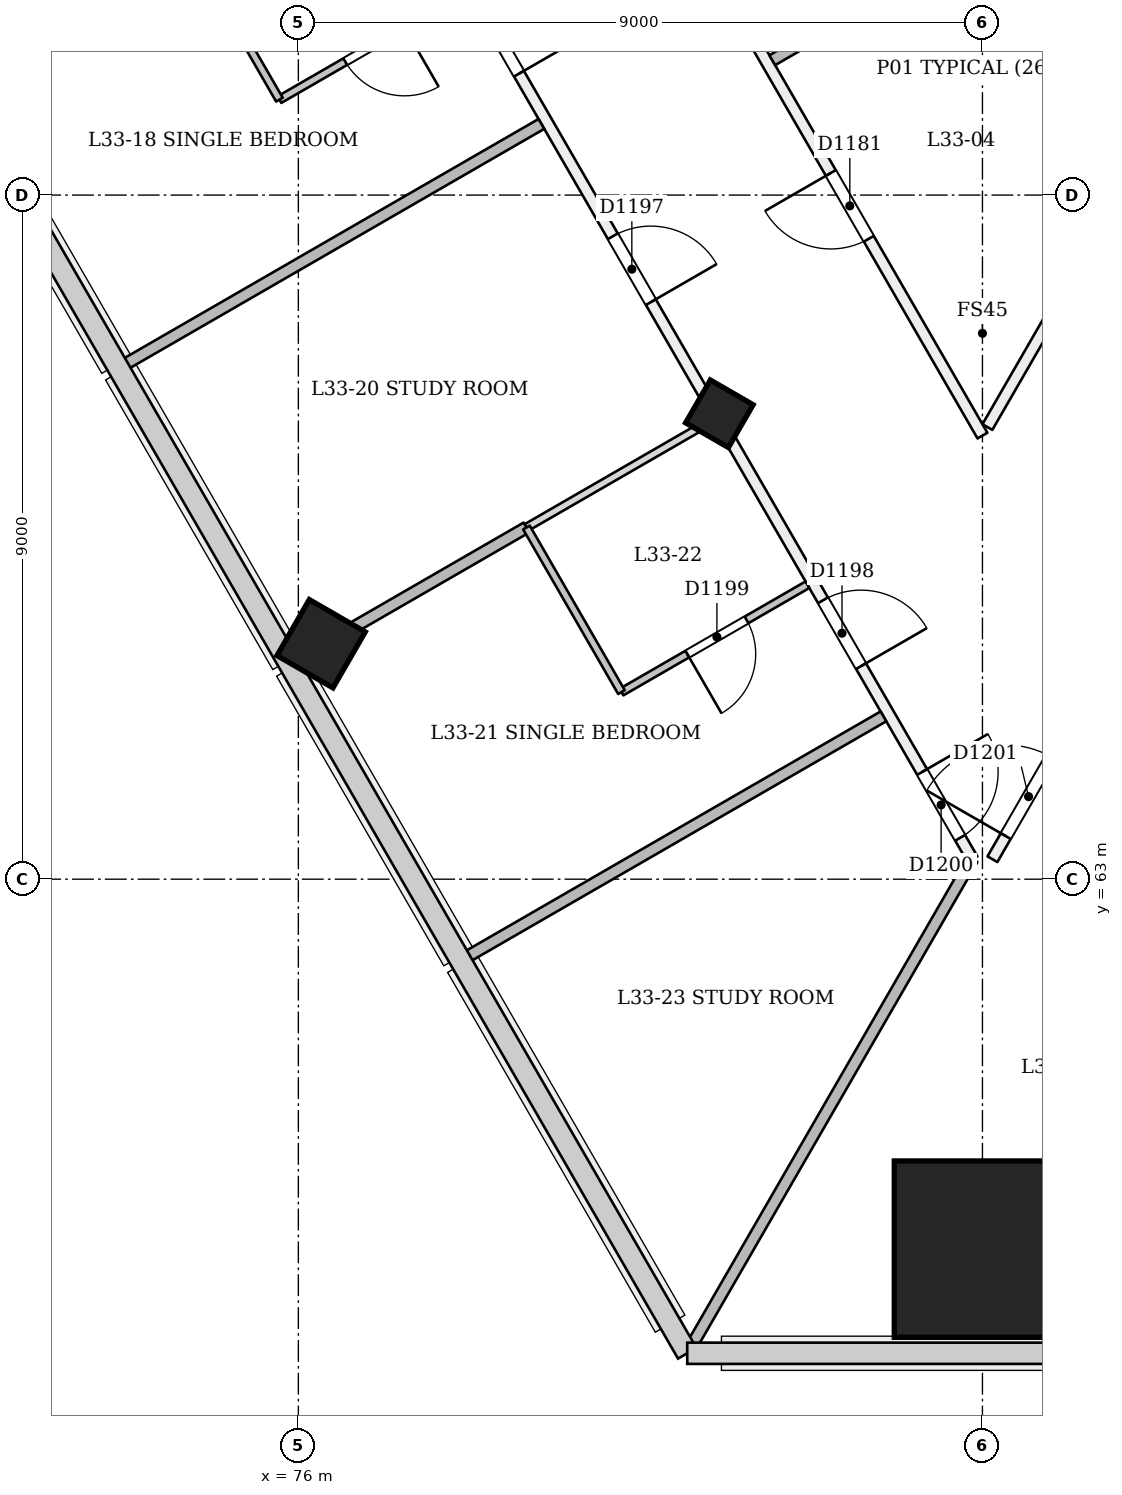
"""IFC4 building model, lengths in metres.
Left out: names, types, materials, properties, quantities, classifications, styles, units other than length and angle.
Written with IfcOpenShell. Run it as: python <this file> out.ifc"""

import sys

from ifc_helpers import new_model, si_unit, direction, frame, frame_2d, origin, origin_2d, place, context, subcontext, project, spatial, rectangle, extrude, element, fill, save


model = new_model("IFC4")
c1 = context("Model", 3, precision=1e-05, world=origin(), true_north=direction((0.0, 1.0)))
c2 = subcontext(c1, "Body", "Model", "MODEL_VIEW")
j1 = project(units=[si_unit("LENGTHUNIT", "METRE"), si_unit("PLANEANGLEUNIT", "RADIAN")], contexts=[c1])
p1 = place(None, origin())
s1 = spatial("IfcSite", under=j1, at=p1, CompositionType="ELEMENT")
p2 = place(p1, origin())
s2 = spatial("IfcBuilding", under=s1, at=p2, CompositionType="ELEMENT")
p3 = place(p2, frame((0.0, 0.0, 131.4)))
s3 = spatial("IfcBuildingStorey", under=s2, at=p3, CompositionType="ELEMENT", Elevation=131.4)
p4 = place(p3, frame((81.512, 69.076, -0.02), z_axis=(0.022155133694, 0.038483534979, 0.999013597298), x_axis=(-0.864982357223, -0.500326545966, 0.038456067068)))
e1 = element("IfcColumn", 1, at=p4, inside=s3, PredefinedType="COLUMN", context=c2, shape_type="SweptSolid", body=[
    extrude(rectangle(XDim=0.65, YDim=0.65, at=origin_2d()), origin(), (0.0, 0.0, 1.0), 3.604),
])
p5 = place(p3, frame((85.0, 58.063, 0.0), z_axis=(0.0, 0.058356907999, 0.998295783467), x_axis=(-1.0, 0.0, 0.0)))
e2 = element("IfcColumn", 2, at=p5, inside=s3, PredefinedType="COLUMN", context=c2, shape_type="SweptSolid", body=[
    extrude(rectangle(XDim=2.32, YDim=2.32, at=origin_2d()), origin(), (0.0, 0.0, 1.0), 3.606),
])
p6 = place(p3, frame((76.272, 66.051, -0.026), z_axis=(0.022222910879, 0.038415824599, 0.999014697916), x_axis=(-0.866023998813, -0.498523032246, 0.038434617219)))
e3 = element("IfcColumn", 3, at=p6, inside=s3, PredefinedType="COLUMN", context=c2, shape_type="SweptSolid", body=[
    extrude(rectangle(XDim=0.85, YDim=0.85, at=origin_2d()), origin(), (0.0, 0.0, 1.0), 3.604),
])
p7 = place(p3, frame((85.0, 68.836, 0.0), z_axis=(0.0, 0.0, 1.0), x_axis=(-0.500001726771, 0.86602440683, 0.0)))
e4 = element("IfcWall", 4, at=p7, inside=s3, PredefinedType="PARTITIONING", context=c2, shape_type="SweptSolid", body=[
    extrude(rectangle(XDim=24.669, YDim=0.15, at=frame_2d((12.335, 0.0))), origin(), (0.0, 0.0, 1.0), 3.15),
])
p8 = place(p7, frame((2.99, 0.0, 0.0)))
e5 = element("IfcOpeningElement", 5, at=p8, cuts=e4, PredefinedType="OPENING", context=c2, shape_type="SweptSolid", body=[
    extrude(rectangle(XDim=1.0, YDim=2.1, at=frame_2d((0.5, 1.05))), frame((0.0, 0.085, 0.0), z_axis=(0.0, -1.0, 0.0), x_axis=(1.0, 0.0, 0.0)), (0.0, 0.0, 1.0), 0.171),
])
p9 = place(p7, frame((15.596, 0.0, 0.0)))
e6 = element("IfcOpeningElement", 6, at=p9, cuts=e4, PredefinedType="OPENING", context=c2, shape_type="SweptSolid", body=[
    extrude(rectangle(XDim=1.0, YDim=2.1, at=frame_2d((0.5, 1.05))), frame((0.0, 0.085, 0.0), z_axis=(0.0, -1.0, 0.0), x_axis=(1.0, 0.0, 0.0)), (0.0, 0.0, 1.0), 0.171),
])
p10 = place(p7, frame((20.822, 0.0, 0.0)))
e7 = element("IfcOpeningElement", 7, at=p10, cuts=e4, PredefinedType="OPENING", context=c2, shape_type="SweptSolid", body=[
    extrude(rectangle(XDim=1.0, YDim=2.1, at=frame_2d((0.5, 1.05))), frame((0.0, 0.085, 0.0), z_axis=(0.0, -1.0, 0.0), x_axis=(1.0, 0.0, 0.0)), (0.0, 0.0, 1.0), 0.171),
])
p11 = place(p7, frame((11.43, 0.0, 0.0)))
e8 = element("IfcOpeningElement", 8, at=p11, cuts=e4, PredefinedType="OPENING", context=c2, shape_type="SweptSolid", body=[
    extrude(rectangle(XDim=1.0, YDim=2.1, at=frame_2d((0.5, 1.05))), frame((0.0, 0.085, 0.0), z_axis=(0.0, -1.0, 0.0), x_axis=(1.0, 0.0, 0.0)), (0.0, 0.0, 1.0), 0.171),
])
p12 = place(p7, frame((7.41, 0.0, 0.0)))
e9 = element("IfcOpeningElement", 9, at=p12, cuts=e4, PredefinedType="OPENING", context=c2, shape_type="SweptSolid", body=[
    extrude(rectangle(XDim=1.0, YDim=2.1, at=frame_2d((0.5, 1.05))), frame((0.0, 0.085, 0.0), z_axis=(0.0, -1.0, 0.0), x_axis=(1.0, 0.0, 0.0)), (0.0, 0.0, 1.0), 0.171),
])
p13 = place(p3, frame((64.656, 98.273, 0.0), z_axis=(0.0, 0.0, 1.0), x_axis=(0.500001784794, -0.866024373331, 0.0)))
e10 = element("IfcWall", 10, at=p13, inside=s3, PredefinedType="PARTITIONING", context=c2, shape_type="SweptSolid", body=[
    extrude(rectangle(XDim=40.426, YDim=0.15, at=frame_2d((20.213, 0.0))), origin(), (0.0, 0.0, 1.0), 2.75),
])
p14 = place(p13, frame((0.2, 0.0, 0.0)))
e11 = element("IfcOpeningElement", 11, at=p14, cuts=e10, PredefinedType="OPENING", context=c2, shape_type="SweptSolid", body=[
    extrude(rectangle(XDim=1.2, YDim=2.1, at=frame_2d((0.6, 1.05))), frame((0.0, 0.085, 0.0), z_axis=(0.0, -1.0, 0.0), x_axis=(1.0, 0.0, 0.0)), (0.0, 0.0, 1.0), 0.171),
])
p15 = place(p13, frame((2.933, 0.0, 0.0)))
e12 = element("IfcOpeningElement", 12, at=p15, cuts=e10, PredefinedType="OPENING", context=c2, shape_type="SweptSolid", body=[
    extrude(rectangle(XDim=1.0, YDim=2.1, at=frame_2d((0.5, 1.05))), frame((0.0, 0.085, 0.0), z_axis=(0.0, -1.0, 0.0), x_axis=(1.0, 0.0, 0.0)), (0.0, 0.0, 1.0), 0.171),
])
p16 = place(p13, frame((9.608, 0.0, 0.0)))
e13 = element("IfcOpeningElement", 13, at=p16, cuts=e10, PredefinedType="OPENING", context=c2, shape_type="SweptSolid", body=[
    extrude(rectangle(XDim=1.0, YDim=2.1, at=frame_2d((0.5, 1.05))), frame((0.0, 0.085, 0.0), z_axis=(0.0, -1.0, 0.0), x_axis=(1.0, 0.0, 0.0)), (0.0, 0.0, 1.0), 0.171),
])
p17 = place(p13, frame((11.818, 0.0, 0.0)))
e14 = element("IfcOpeningElement", 14, at=p17, cuts=e10, PredefinedType="OPENING", context=c2, shape_type="SweptSolid", body=[
    extrude(rectangle(XDim=1.0, YDim=2.1, at=frame_2d((0.5, 1.05))), frame((0.0, 0.085, 0.0), z_axis=(0.0, -1.0, 0.0), x_axis=(1.0, 0.0, 0.0)), (0.0, 0.0, 1.0), 0.171),
])
p18 = place(p13, frame((18.493, 0.0, 0.0)))
e15 = element("IfcOpeningElement", 15, at=p18, cuts=e10, PredefinedType="OPENING", context=c2, shape_type="SweptSolid", body=[
    extrude(rectangle(XDim=1.0, YDim=2.1, at=frame_2d((0.5, 1.05))), frame((0.0, 0.085, 0.0), z_axis=(0.0, -1.0, 0.0), x_axis=(1.0, 0.0, 0.0)), (0.0, 0.0, 1.0), 0.171),
])
p19 = place(p13, frame((21.963, 0.0, 0.0)))
e16 = element("IfcOpeningElement", 16, at=p19, cuts=e10, PredefinedType="OPENING", context=c2, shape_type="SweptSolid", body=[
    extrude(rectangle(XDim=1.0, YDim=2.1, at=frame_2d((0.5, 1.05))), frame((0.0, 0.085, 0.0), z_axis=(0.0, -1.0, 0.0), x_axis=(1.0, 0.0, 0.0)), (0.0, 0.0, 1.0), 0.171),
])
p20 = place(p13, frame((27.493, 0.0, 0.0)))
e17 = element("IfcOpeningElement", 17, at=p20, cuts=e10, PredefinedType="OPENING", context=c2, shape_type="SweptSolid", body=[
    extrude(rectangle(XDim=1.0, YDim=2.1, at=frame_2d((0.5, 1.05))), frame((0.0, 0.085, 0.0), z_axis=(0.0, -1.0, 0.0), x_axis=(1.0, 0.0, 0.0)), (0.0, 0.0, 1.0), 0.171),
])
p21 = place(p13, frame((30.963, 0.0, 0.0)))
e18 = element("IfcOpeningElement", 18, at=p21, cuts=e10, PredefinedType="OPENING", context=c2, shape_type="SweptSolid", body=[
    extrude(rectangle(XDim=1.0, YDim=2.1, at=frame_2d((0.5, 1.05))), frame((0.0, 0.085, 0.0), z_axis=(0.0, -1.0, 0.0), x_axis=(1.0, 0.0, 0.0)), (0.0, 0.0, 1.0), 0.171),
])
p22 = place(p13, frame((36.493, 0.0, 0.0)))
e19 = element("IfcOpeningElement", 19, at=p22, cuts=e10, PredefinedType="OPENING", context=c2, shape_type="SweptSolid", body=[
    extrude(rectangle(XDim=1.0, YDim=2.1, at=frame_2d((0.5, 1.05))), frame((0.0, 0.085, 0.0), z_axis=(0.0, -1.0, 0.0), x_axis=(1.0, 0.0, 0.0)), (0.0, 0.0, 1.0), 0.171),
])
p23 = place(p13, frame((39.101, 0.0, 0.0)))
e20 = element("IfcOpeningElement", 20, at=p23, cuts=e10, PredefinedType="OPENING", context=c2, shape_type="SweptSolid", body=[
    extrude(rectangle(XDim=1.0, YDim=2.1, at=frame_2d((0.5, 1.05))), frame((0.0, 0.085, 0.0), z_axis=(0.0, -1.0, 0.0), x_axis=(1.0, 0.0, 0.0)), (0.0, 0.0, 1.0), 0.171),
])
p24 = place(p3, frame((85.131, 63.263, 0.0), z_axis=(0.0, 0.0, 1.0), x_axis=(0.500002881847, 0.866023739943, 0.0)))
e21 = element("IfcWall", 21, at=p24, inside=s3, PredefinedType="PARTITIONING", context=c2, shape_type="SweptSolid", body=[
    extrude(rectangle(XDim=34.013, YDim=0.15, at=frame_2d((17.006, 0.0))), origin(), (0.0, 0.0, 1.0), 2.75),
])
p25 = place(p24, frame((0.351, 0.0, 0.0)))
e22 = element("IfcOpeningElement", 22, at=p25, cuts=e21, PredefinedType="OPENING", context=c2, shape_type="SweptSolid", body=[
    extrude(rectangle(XDim=1.2, YDim=2.1, at=frame_2d((0.6, 1.05))), frame((0.0, 0.085, 0.0), z_axis=(0.0, -1.0, 0.0), x_axis=(1.0, 0.0, 0.0)), (0.0, 0.0, 1.0), 0.171),
])
p26 = place(p24, frame((3.963, 0.0, 0.0)))
e23 = element("IfcOpeningElement", 23, at=p26, cuts=e21, PredefinedType="OPENING", context=c2, shape_type="SweptSolid", body=[
    extrude(rectangle(XDim=1.0, YDim=2.1, at=frame_2d((0.5, 1.05))), frame((0.0, 0.085, 0.0), z_axis=(0.0, -1.0, 0.0), x_axis=(1.0, 0.0, 0.0)), (0.0, 0.0, 1.0), 0.171),
])
p27 = place(p24, frame((9.493, 0.0, 0.0)))
e24 = element("IfcOpeningElement", 24, at=p27, cuts=e21, PredefinedType="OPENING", context=c2, shape_type="SweptSolid", body=[
    extrude(rectangle(XDim=1.0, YDim=2.1, at=frame_2d((0.5, 1.05))), frame((0.0, 0.085, 0.0), z_axis=(0.0, -1.0, 0.0), x_axis=(1.0, 0.0, 0.0)), (0.0, 0.0, 1.0), 0.171),
])
p28 = place(p24, frame((11.818, 0.0, 0.0)))
e25 = element("IfcOpeningElement", 25, at=p28, cuts=e21, PredefinedType="OPENING", context=c2, shape_type="SweptSolid", body=[
    extrude(rectangle(XDim=1.0, YDim=2.1, at=frame_2d((0.5, 1.05))), frame((0.0, 0.085, 0.0), z_axis=(0.0, -1.0, 0.0), x_axis=(1.0, 0.0, 0.0)), (0.0, 0.0, 1.0), 0.171),
])
p29 = place(p24, frame((18.608, 0.0, 0.0)))
e26 = element("IfcOpeningElement", 26, at=p29, cuts=e21, PredefinedType="OPENING", context=c2, shape_type="SweptSolid", body=[
    extrude(rectangle(XDim=1.0, YDim=2.1, at=frame_2d((0.5, 1.05))), frame((0.0, 0.085, 0.0), z_axis=(0.0, -1.0, 0.0), x_axis=(1.0, 0.0, 0.0)), (0.0, 0.0, 1.0), 0.171),
])
p30 = place(p24, frame((20.933, 0.0, 0.0)))
e27 = element("IfcOpeningElement", 27, at=p30, cuts=e21, PredefinedType="OPENING", context=c2, shape_type="SweptSolid", body=[
    extrude(rectangle(XDim=1.0, YDim=2.1, at=frame_2d((0.5, 1.05))), frame((0.0, 0.085, 0.0), z_axis=(0.0, -1.0, 0.0), x_axis=(1.0, 0.0, 0.0)), (0.0, 0.0, 1.0), 0.171),
])
p31 = place(p24, frame((27.493, 0.0, 0.0)))
e28 = element("IfcOpeningElement", 28, at=p31, cuts=e21, PredefinedType="OPENING", context=c2, shape_type="SweptSolid", body=[
    extrude(rectangle(XDim=1.0, YDim=2.1, at=frame_2d((0.5, 1.05))), frame((0.0, 0.085, 0.0), z_axis=(0.0, -1.0, 0.0), x_axis=(1.0, 0.0, 0.0)), (0.0, 0.0, 1.0), 0.171),
])
p32 = place(p24, frame((29.933, 0.0, 0.0)))
e29 = element("IfcOpeningElement", 29, at=p32, cuts=e21, PredefinedType="OPENING", context=c2, shape_type="SweptSolid", body=[
    extrude(rectangle(XDim=1.0, YDim=2.1, at=frame_2d((0.5, 1.05))), frame((0.0, 0.085, 0.0), z_axis=(0.0, -1.0, 0.0), x_axis=(1.0, 0.0, 0.0)), (0.0, 0.0, 1.0), 0.171),
])
p33 = place(p3, frame((97.335, 90.2, 0.0), z_axis=(0.0, 0.0, 1.0), x_axis=(-0.500002918398, -0.86602371884, 0.0)))
e30 = element("IfcWall", 30, at=p33, inside=s3, PredefinedType="PARTITIONING", context=c2, shape_type="SweptSolid", body=[
    extrude(rectangle(XDim=24.539, YDim=0.15, at=frame_2d((12.27, 0.0))), origin(), (0.0, 0.0, 1.0), 3.15),
])
p34 = place(p33, frame((6.442, 0.0, 0.0)))
e31 = element("IfcOpeningElement", 31, at=p34, cuts=e30, PredefinedType="OPENING", context=c2, shape_type="SweptSolid", body=[
    extrude(rectangle(XDim=0.9, YDim=2.1, at=frame_2d((0.45, 1.05))), frame((0.0, 0.085, 0.0), z_axis=(0.0, -1.0, 0.0), x_axis=(1.0, 0.0, 0.0)), (0.0, 0.0, 1.0), 0.171),
])
p35 = place(p33, frame((2.46, 0.0, 0.0)))
e32 = element("IfcOpeningElement", 32, at=p35, cuts=e30, PredefinedType="OPENING", context=c2, shape_type="SweptSolid", body=[
    extrude(rectangle(XDim=0.9, YDim=2.1, at=frame_2d((0.45, 1.05))), frame((0.0, 0.085, 0.0), z_axis=(0.0, -1.0, 0.0), x_axis=(1.0, 0.0, 0.0)), (0.0, 0.0, 1.0), 0.171),
])
p36 = place(p33, frame((15.454, 0.0, 0.0)))
e33 = element("IfcOpeningElement", 33, at=p36, cuts=e30, PredefinedType="OPENING", context=c2, shape_type="SweptSolid", body=[
    extrude(rectangle(XDim=1.0, YDim=2.1, at=frame_2d((0.5, 1.05))), frame((0.0, 0.085, 0.0), z_axis=(0.0, -1.0, 0.0), x_axis=(1.0, 0.0, 0.0)), (0.0, 0.0, 1.0), 0.171),
])
p37 = place(p33, frame((10.281, 0.0, 0.0)))
e34 = element("IfcOpeningElement", 34, at=p37, cuts=e30, PredefinedType="OPENING", context=c2, shape_type="SweptSolid", body=[
    extrude(rectangle(XDim=1.0, YDim=2.1, at=frame_2d((0.5, 1.05))), frame((0.0, 0.085, 0.0), z_axis=(0.0, -1.0, 0.0), x_axis=(1.0, 0.0, 0.0)), (0.0, 0.0, 1.0), 0.171),
])
p38 = place(p3, frame((86.109, 76.011, 0.0), z_axis=(0.0, 0.0, 1.0), x_axis=(-0.866024728453, -0.500001169707, 0.0)))
e35 = element("IfcWall", 35, at=p38, inside=s3, PredefinedType="PARTITIONING", context=c2, shape_type="SweptSolid", body=[
    extrude(rectangle(XDim=4.474, YDim=0.15, at=frame_2d((2.237, 0.0))), origin(), (0.0, 0.0, 1.0), 3.15),
])
p39 = place(p3, frame((71.47, 73.671, 0.0), z_axis=(0.0, 0.0, 1.0), x_axis=(0.866015887322, 0.500016482634, 0.0)))
e36 = element("IfcWall", 36, at=p39, inside=s3, PredefinedType="PARTITIONING", context=c2, shape_type="SweptSolid", body=[
    extrude(rectangle(XDim=6.325, YDim=0.1, at=frame_2d((3.163, 0.0))), origin(), (0.0, 0.0, 1.0), 2.65),
])
p40 = place(p3, frame((78.197, 74.668, 0.0), z_axis=(0.0, 0.0, 1.0), x_axis=(-0.865989837833, -0.500061596976, 0.0)))
e37 = element("IfcWall", 37, at=p40, inside=s3, PredefinedType="PARTITIONING", context=c2, shape_type="SweptSolid", body=[
    extrude(rectangle(XDim=2.825, YDim=0.1, at=frame_2d((1.413, 0.0))), origin(), (0.0, 0.0, 1.0), 3.15),
])
p41 = place(p40, frame((0.925, 0.0, 0.0)))
e38 = element("IfcOpeningElement", 38, at=p41, cuts=e37, PredefinedType="OPENING", context=c2, shape_type="SweptSolid", body=[
    extrude(rectangle(XDim=0.9, YDim=2.1, at=frame_2d((0.45, 1.05))), frame((0.0, 0.061, 0.0), z_axis=(0.0, -1.0, 0.0), x_axis=(1.0, 0.0, 0.0)), (0.0, 0.0, 1.0), 0.121),
])
p42 = place(p3, frame((75.751, 73.256, 0.0), z_axis=(0.0, 0.0, 1.0), x_axis=(-0.500018594424, 0.866014668023, 0.0)))
e39 = element("IfcWall", 39, at=p42, inside=s3, PredefinedType="PARTITIONING", context=c2, shape_type="SweptSolid", body=[
    extrude(rectangle(XDim=2.45, YDim=0.1, at=frame_2d((1.225, 0.0))), origin(), (0.0, 0.0, 1.0), 2.75),
])
p43 = place(p3, frame((73.702, 69.763, 0.0), z_axis=(0.0, 0.0, 1.0), x_axis=(0.866025401434, 0.500000004071, 0.0)))
e40 = element("IfcWall", 40, at=p43, inside=s3, PredefinedType="PARTITIONING", context=c2, shape_type="SweptSolid", body=[
    extrude(rectangle(XDim=6.345, YDim=0.15, at=frame_2d((3.173, 0.0))), origin(), (0.0, 0.0, 1.0), 2.65),
])
p44 = place(p3, frame((75.97, 65.876, 0.0), z_axis=(0.0, 0.0, 1.0), x_axis=(0.866036909293, 0.499980071345, 0.0)))
e41 = element("IfcWall", 41, at=p44, inside=s3, PredefinedType="PARTITIONING", context=c2, shape_type="SweptSolid", body=[
    extrude(rectangle(XDim=3.5, YDim=0.15, at=frame_2d((1.75, 0.0))), origin(), (0.0, 0.0, 1.0), 2.65),
])
p45 = place(p3, frame((79.001, 67.626, 0.0), z_axis=(0.0, 0.0, 1.0), x_axis=(0.865989837833, 0.500061596976, 0.0)))
e42 = element("IfcWall", 42, at=p45, inside=s3, PredefinedType="PARTITIONING", context=c2, shape_type="SweptSolid", body=[
    extrude(rectangle(XDim=2.825, YDim=0.1, at=frame_2d((1.413, 0.0))), origin(), (0.0, 0.0, 1.0), 2.75),
])
p46 = place(p3, frame((82.697, 66.874, 0.0), z_axis=(0.0, 0.0, 1.0), x_axis=(-0.865989837833, -0.500061596976, 0.0)))
e43 = element("IfcWall", 43, at=p46, inside=s3, PredefinedType="PARTITIONING", context=c2, shape_type="SweptSolid", body=[
    extrude(rectangle(XDim=2.825, YDim=0.1, at=frame_2d((1.413, 0.0))), origin(), (0.0, 0.0, 1.0), 3.15),
])
p47 = place(p46, frame((0.925, 0.0, 0.0)))
e44 = element("IfcOpeningElement", 44, at=p47, cuts=e43, PredefinedType="OPENING", context=c2, shape_type="SweptSolid", body=[
    extrude(rectangle(XDim=0.9, YDim=2.1, at=frame_2d((0.45, 1.05))), frame((0.0, 0.061, 0.0), z_axis=(0.0, -1.0, 0.0), x_axis=(1.0, 0.0, 0.0)), (0.0, 0.0, 1.0), 0.121),
])
p48 = place(p3, frame((80.251, 65.461, 0.0), z_axis=(0.0, 0.0, 1.0), x_axis=(-0.500004234368, 0.866022959057, 0.0)))
e45 = element("IfcWall", 45, at=p48, inside=s3, PredefinedType="PARTITIONING", context=c2, shape_type="SweptSolid", body=[
    extrude(rectangle(XDim=2.5, YDim=0.1, at=frame_2d((1.25, 0.0))), origin(), (0.0, 0.0, 1.0), 2.75),
])
p49 = place(p3, frame((78.202, 61.969, 0.0), z_axis=(0.0, 0.0, 1.0), x_axis=(0.866035020038, 0.499983343791, 0.0)))
e46 = element("IfcWall", 46, at=p49, inside=s3, PredefinedType="PARTITIONING", context=c2, shape_type="SweptSolid", body=[
    extrude(rectangle(XDim=6.345, YDim=0.15, at=frame_2d((3.173, 0.0))), origin(), (0.0, 0.0, 1.0), 2.65),
])
p50 = place(p3, frame((81.159, 56.837, 0.0), z_axis=(0.0, 0.0, 1.0), x_axis=(0.499993047099, 0.866029418006, 0.0)))
e47 = element("IfcWall", 47, at=p50, inside=s3, PredefinedType="PARTITIONING", context=c2, shape_type="SweptSolid", body=[
    extrude(rectangle(XDim=7.419, YDim=0.15, at=frame_2d((3.71, 0.0))), origin(), (0.0, 0.0, 1.0), 2.65),
])
p51 = place(p8, origin())
e48 = element("IfcDoor", 48, at=p51, inside=s3, OperationType="SINGLE_SWING_RIGHT", PredefinedType="NOTDEFINED", context=c2, shape_type="SweptSolid", body=[
    extrude(rectangle(XDim=1.0, YDim=2.1, at=frame_2d((0.5, 1.05))), frame((0.0, 0.025, 0.0), z_axis=(0.0, -1.0, 0.0), x_axis=(1.0, 0.0, 0.0)), (0.0, 0.0, 1.0), 0.05),
])
fill(e5, e48)
p52 = place(p20, origin())
e49 = element("IfcDoor", 49, at=p52, inside=s3, OperationType="SINGLE_SWING_RIGHT", PredefinedType="NOTDEFINED", context=c2, shape_type="SweptSolid", body=[
    extrude(rectangle(XDim=1.0, YDim=2.1, at=frame_2d((0.5, 1.05))), frame((0.0, 0.025, 0.0), z_axis=(0.0, -1.0, 0.0), x_axis=(1.0, 0.0, 0.0)), (0.0, 0.0, 1.0), 0.05),
])
fill(e17, e49)
p53 = place(p41, origin())
e50 = element("IfcDoor", 50, at=p53, inside=s3, OperationType="SINGLE_SWING_LEFT", PredefinedType="NOTDEFINED", context=c2, shape_type="SweptSolid", body=[
    extrude(rectangle(XDim=0.9, YDim=2.1, at=frame_2d((0.45, 1.05))), frame((0.0, 0.025, 0.0), z_axis=(0.0, -1.0, 0.0), x_axis=(1.0, 0.0, 0.0)), (0.0, 0.0, 1.0), 0.05),
])
fill(e38, e50)
p54 = place(p21, origin())
e51 = element("IfcDoor", 51, at=p54, inside=s3, OperationType="SINGLE_SWING_RIGHT", PredefinedType="NOTDEFINED", context=c2, shape_type="SweptSolid", body=[
    extrude(rectangle(XDim=1.0, YDim=2.1, at=frame_2d((0.5, 1.05))), frame((0.0, 0.025, 0.0), z_axis=(0.0, -1.0, 0.0), x_axis=(1.0, 0.0, 0.0)), (0.0, 0.0, 1.0), 0.05),
])
fill(e18, e51)
p55 = place(p22, origin())
e52 = element("IfcDoor", 52, at=p55, inside=s3, OperationType="SINGLE_SWING_RIGHT", PredefinedType="NOTDEFINED", context=c2, shape_type="SweptSolid", body=[
    extrude(rectangle(XDim=1.0, YDim=2.1, at=frame_2d((0.5, 1.05))), frame((0.0, 0.025, 0.0), z_axis=(0.0, -1.0, 0.0), x_axis=(1.0, 0.0, 0.0)), (0.0, 0.0, 1.0), 0.05),
])
fill(e19, e52)
p56 = place(p47, origin())
e53 = element("IfcDoor", 53, at=p56, inside=s3, OperationType="SINGLE_SWING_RIGHT", PredefinedType="NOTDEFINED", context=c2, shape_type="SweptSolid", body=[
    extrude(rectangle(XDim=0.9, YDim=2.1, at=frame_2d((0.45, 1.05))), frame((0.0, 0.025, 0.0), z_axis=(0.0, -1.0, 0.0), x_axis=(1.0, 0.0, 0.0)), (0.0, 0.0, 1.0), 0.05),
])
fill(e44, e53)
p57 = place(p23, origin())
e54 = element("IfcDoor", 54, at=p57, inside=s3, OperationType="SINGLE_SWING_LEFT", PredefinedType="NOTDEFINED", context=c2, shape_type="SweptSolid", body=[
    extrude(rectangle(XDim=1.0, YDim=2.1, at=frame_2d((0.5, 1.05))), frame((0.0, 0.025, 0.0), z_axis=(0.0, -1.0, 0.0), x_axis=(1.0, 0.0, 0.0)), (0.0, 0.0, 1.0), 0.05),
])
fill(e20, e54)
p58 = place(p25, origin())
e55 = element("IfcDoor", 55, at=p58, inside=s3, OperationType="SINGLE_SWING_LEFT", PredefinedType="NOTDEFINED", context=c2, shape_type="SweptSolid", body=[
    extrude(rectangle(XDim=1.2, YDim=2.1, at=frame_2d((0.6, 1.05))), frame((0.0, 0.025, 0.0), z_axis=(0.0, -1.0, 0.0), x_axis=(1.0, 0.0, 0.0)), (0.0, 0.0, 1.0), 0.05),
])
fill(e22, e55)
save(model, sys.argv[1])
